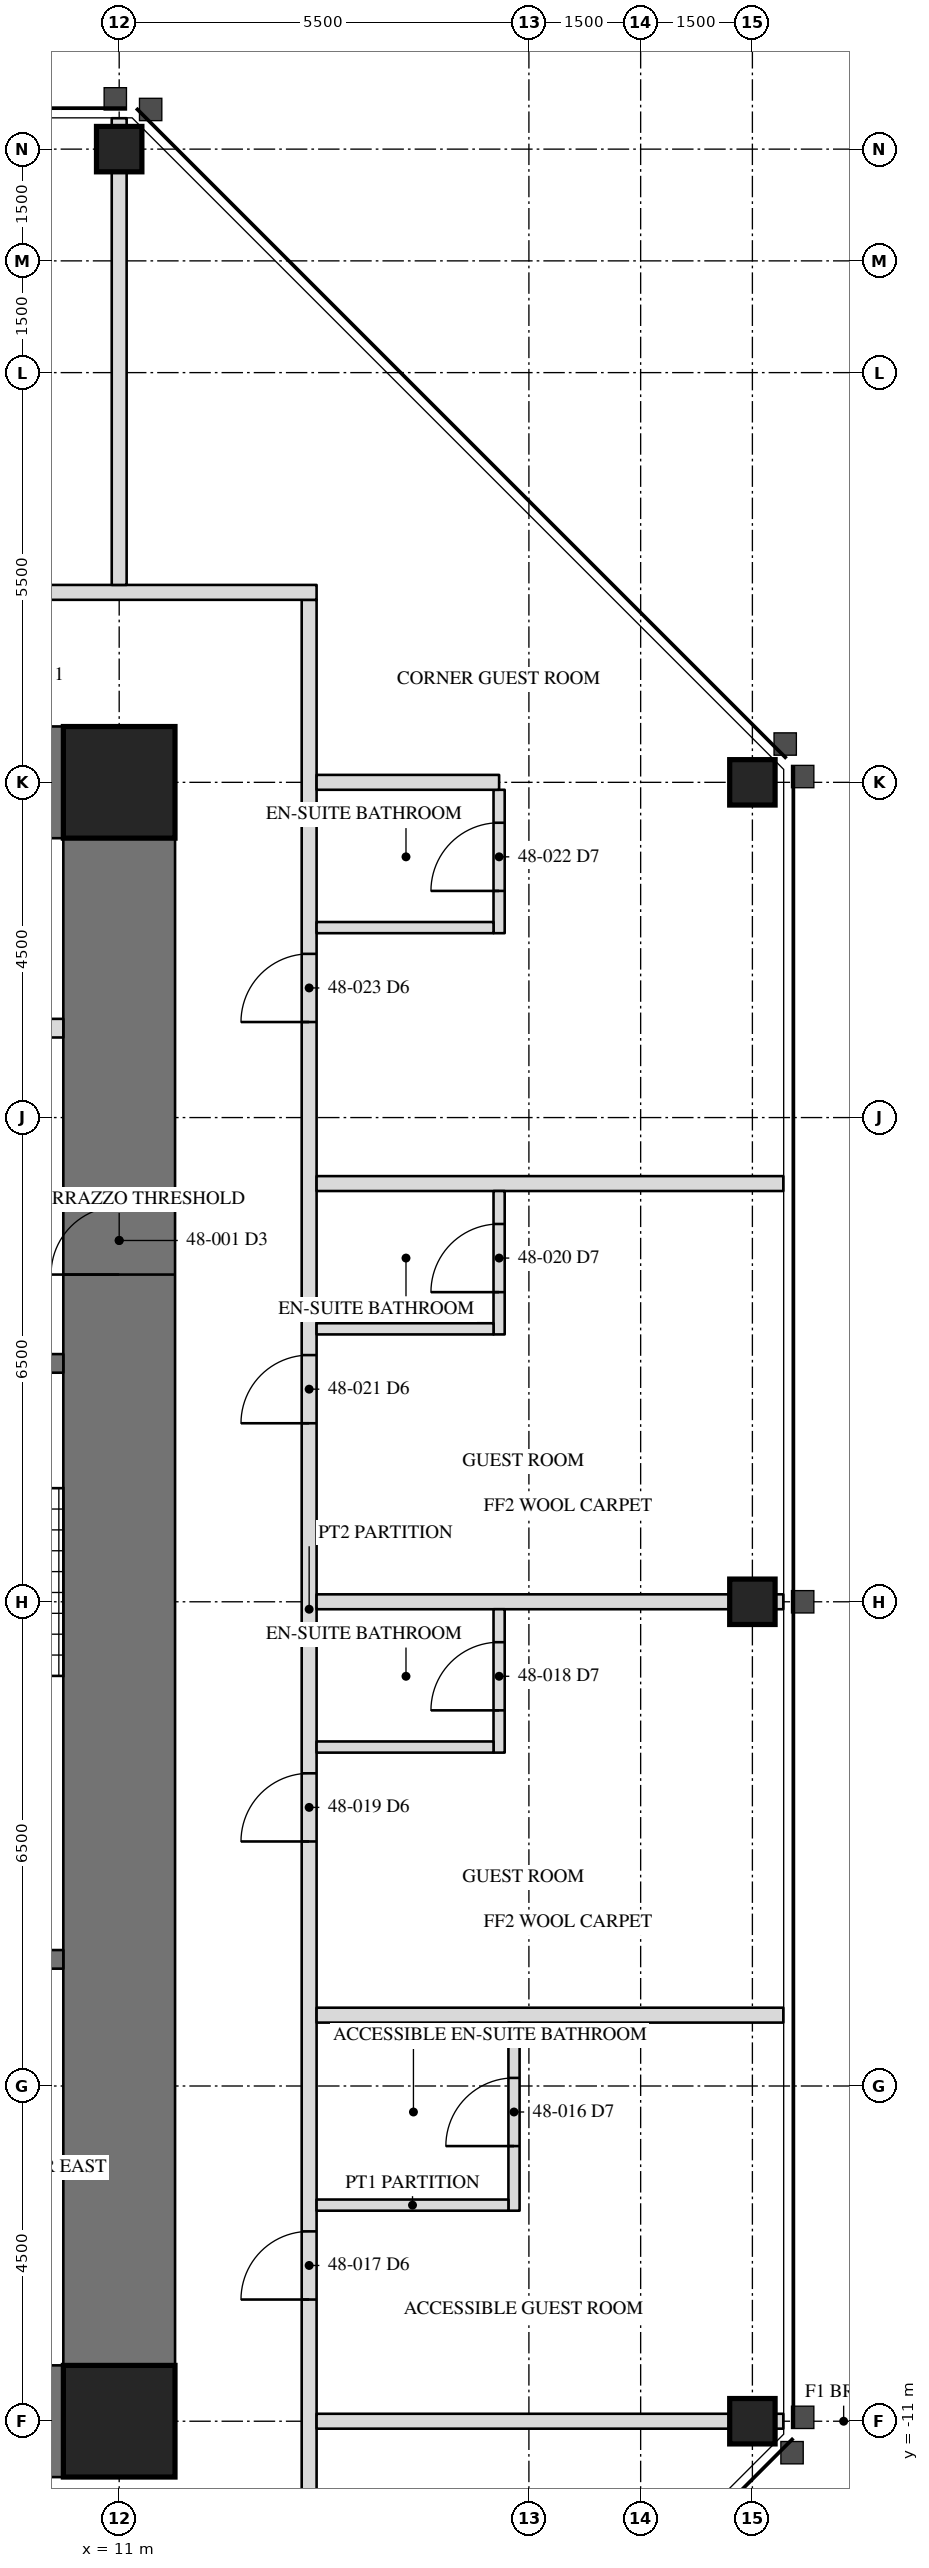
"""IFC4 building model, lengths in metres.
Left out: names, types, materials, properties, quantities, classifications, styles, units other than length and angle.
Written with IfcOpenShell. Run it as: python <this file> out.ifc"""

import sys

from ifc_helpers import new_model, si_unit, direction, frame, frame_2d, origin, origin_2d, place, context, subcontext, project, spatial, rectangle, hollow_rectangle, extrude, element, fill, save


model = new_model("IFC4")
c1 = context("Model", 3, precision=1e-05, world=origin(), true_north=direction((0.0, 1.0)))
c2 = subcontext(c1, "Body", "Model", "MODEL_VIEW")
j1 = project(units=[si_unit("LENGTHUNIT", "METRE"), si_unit("PLANEANGLEUNIT", "RADIAN")], contexts=[c1])
p1 = place(None, origin())
s1 = spatial("IfcSite", under=j1, at=p1, CompositionType="ELEMENT")
p2 = place(p1, origin())
s2 = spatial("IfcBuilding", under=s1, at=p2, CompositionType="ELEMENT")
p3 = place(p2, frame((0.0, 0.0, 204.7)))
s3 = spatial("IfcBuildingStorey", under=s2, at=p3, CompositionType="ELEMENT", Elevation=204.7)
for number, where, z_axis, x_axis in (
    (1, (19.5, -11.0, 0.0), (0.0, 0.0, 1.0), (0.0, 1.0, 0.0)),
    (2, (19.5, 0.0, 0.0), (0.0, 0.0, 1.0), (0.0, 1.0, 0.0)),
    (3, (19.5, 11.0, 0.0), (0.0, 0.0, 1.0), (0.0, 1.0, 0.0)),
    (4, (11.0, 19.5, 0.0), (0.0, 0.0, 1.0), (1.0, 0.0, 0.0)),
):
    element("IfcColumn", number, at=place(p3, frame(where, z_axis=z_axis, x_axis=x_axis)), inside=s3, PredefinedType="COLUMN", context=c2, shape_type="SweptSolid", body=[
        extrude(hollow_rectangle(XDim=0.61, YDim=0.61, WallThickness=0.076, at=origin_2d()), origin(), (0.0, 0.0, 1.0), 3.5),
    ])
p4 = place(p3, frame((11.0, -11.0, 0.0), z_axis=(0.0, 0.0, 1.0), x_axis=(0.0, 1.0, 0.0)))
e5 = element("IfcWall", 5, at=p4, inside=s3, PredefinedType="SHEAR", context=c2, shape_type="SweptSolid", body=[
    extrude(rectangle(XDim=22.0, YDim=1.5, at=frame_2d((11.0, 0.0))), origin(), (0.0, 0.0, 1.0), 3.5),
])
p5 = place(p4, frame((15.393, 0.0, 0.0)))
e6 = element("IfcOpeningElement", 6, at=p5, cuts=e5, PredefinedType="OPENING", context=c2, shape_type="SweptSolid", body=[
    extrude(rectangle(XDim=0.915, YDim=2.134, at=frame_2d((0.458, 1.067))), frame((0.0, 0.76, 0.0), z_axis=(0.0, -1.0, 0.0), x_axis=(1.0, 0.0, 0.0)), (0.0, 0.0, 1.0), 1.52),
])
for number, where, z_axis, x_axis in (
    (7, (11.0, 11.0, 0.0), (0.0, 0.0, 1.0), (-1.0, 0.0, 0.0)),
    (8, (6.5, -11.0, 0.0), (0.0, 0.0, 1.0), (1.0, 0.0, 0.0)),
):
    element("IfcWall", number, at=place(p3, frame(where, z_axis=z_axis, x_axis=x_axis)), inside=s3, PredefinedType="SHEAR", context=c2, shape_type="SweptSolid", body=[
        extrude(rectangle(XDim=4.5, YDim=1.5, at=frame_2d((2.25, 0.0))), origin(), (0.0, 0.0, 1.0), 3.5),
    ])
for number, where, z_axis, x_axis in (
    (9, (11.0, 11.0, 0.0), (0.0, 0.0, 1.0), (1.0, 0.0, 0.0)),
    (10, (11.0, -11.0, 0.0), (0.0, 0.0, 1.0), (1.0, 0.0, 0.0)),
):
    element("IfcColumn", number, at=place(p3, frame(where, z_axis=z_axis, x_axis=x_axis)), inside=s3, PredefinedType="COLUMN", context=c2, shape_type="SweptSolid", body=[
        extrude(hollow_rectangle(XDim=1.499, YDim=1.499, WallThickness=0.102, at=origin_2d()), origin(), (0.0, 0.0, 1.0), 3.5),
    ])
p6 = place(p3, frame((6.95, -4.8, 0.0), z_axis=(0.0, 0.0, 1.0), x_axis=(1.0, 0.0, 0.0)))
e11 = element("IfcWall", 11, at=p6, inside=s3, PredefinedType="SOLIDWALL", context=c2, shape_type="SweptSolid", body=[
    extrude(rectangle(XDim=3.3, YDim=0.25, at=frame_2d((1.65, 0.0))), origin(), (0.0, 0.0, 1.0), 3.31),
])
p7 = place(p3, frame((6.95, 3.2, 0.0), z_axis=(0.0, 0.0, 1.0), x_axis=(1.0, 0.0, 0.0)))
e12 = element("IfcWall", 12, at=p7, inside=s3, PredefinedType="SOLIDWALL", context=c2, shape_type="SweptSolid", body=[
    extrude(rectangle(XDim=3.3, YDim=0.25, at=frame_2d((1.65, 0.0))), origin(), (0.0, 0.0, 1.0), 3.31),
])
p8 = place(p7, frame((1.116, 0.0, 0.0)))
e13 = element("IfcOpeningElement", 13, at=p8, cuts=e12, PredefinedType="OPENING", context=c2, shape_type="SweptSolid", body=[
    extrude(rectangle(XDim=1.067, YDim=2.134, at=frame_2d((0.533, 1.067))), frame((0.0, 0.135, 0.0), z_axis=(0.0, -1.0, 0.0), x_axis=(1.0, 0.0, 0.0)), (0.0, 0.0, 1.0), 0.27),
])
p9 = place(p3, frame((6.95, 7.7, 0.0), z_axis=(0.0, 0.0, 1.0), x_axis=(1.0, 0.0, 0.0)))
e14 = element("IfcWall", 14, at=p9, inside=s3, PredefinedType="PARTITIONING", context=c2, shape_type="SweptSolid", body=[
    extrude(rectangle(XDim=3.3, YDim=0.25, at=frame_2d((1.65, 0.0))), origin(), (0.0, 0.0, 1.0), 3.31),
])
p10 = place(p9, frame((0.45, 0.0, 0.0)))
e15 = element("IfcOpeningElement", 15, at=p10, cuts=e14, PredefinedType="OPENING", context=c2, shape_type="SweptSolid", body=[
    extrude(rectangle(XDim=1.219, YDim=2.134, at=frame_2d((0.609, 1.067))), frame((0.0, 0.135, 0.0), z_axis=(0.0, -1.0, 0.0), x_axis=(1.0, 0.0, 0.0)), (0.0, 0.0, 1.0), 0.27),
])
p11 = place(p3, frame((13.55, -13.65, 0.0), z_axis=(0.0, 0.0, 1.0), x_axis=(0.0, 1.0, 0.0)))
e16 = element("IfcWall", 16, at=p11, inside=s3, PredefinedType="PARTITIONING", context=c2, shape_type="SweptSolid", body=[
    extrude(rectangle(XDim=27.1, YDim=0.2, at=frame_2d((13.55, 0.0))), origin(), (0.0, 0.0, 1.0), 3.31),
])
p12 = place(p11, frame((4.283, 0.0, 0.0)))
e17 = element("IfcOpeningElement", 17, at=p12, cuts=e16, PredefinedType="OPENING", context=c2, shape_type="SweptSolid", body=[
    extrude(rectangle(XDim=0.915, YDim=2.134, at=frame_2d((0.458, 1.067))), frame((0.0, 0.11, 0.0), z_axis=(0.0, -1.0, 0.0), x_axis=(1.0, 0.0, 0.0)), (0.0, 0.0, 1.0), 0.22),
])
p13 = place(p11, frame((10.433, 0.0, 0.0)))
e18 = element("IfcOpeningElement", 18, at=p13, cuts=e16, PredefinedType="OPENING", context=c2, shape_type="SweptSolid", body=[
    extrude(rectangle(XDim=0.915, YDim=2.134, at=frame_2d((0.458, 1.067))), frame((0.0, 0.11, 0.0), z_axis=(0.0, -1.0, 0.0), x_axis=(1.0, 0.0, 0.0)), (0.0, 0.0, 1.0), 0.22),
])
p14 = place(p11, frame((16.046, 0.0, 0.0)))
e19 = element("IfcOpeningElement", 19, at=p14, cuts=e16, PredefinedType="OPENING", context=c2, shape_type="SweptSolid", body=[
    extrude(rectangle(XDim=0.915, YDim=2.134, at=frame_2d((0.458, 1.067))), frame((0.0, 0.11, 0.0), z_axis=(0.0, -1.0, 0.0), x_axis=(1.0, 0.0, 0.0)), (0.0, 0.0, 1.0), 0.22),
])
p15 = place(p11, frame((21.433, 0.0, 0.0)))
e20 = element("IfcOpeningElement", 20, at=p15, cuts=e16, PredefinedType="OPENING", context=c2, shape_type="SweptSolid", body=[
    extrude(rectangle(XDim=0.915, YDim=2.134, at=frame_2d((0.458, 1.067))), frame((0.0, 0.11, 0.0), z_axis=(0.0, -1.0, 0.0), x_axis=(1.0, 0.0, 0.0)), (0.0, 0.0, 1.0), 0.22),
])
p16 = place(p3, frame((13.65, 13.55, 0.0), z_axis=(0.0, 0.0, 1.0), x_axis=(-1.0, 0.0, 0.0)))
e21 = element("IfcWall", 21, at=p16, inside=s3, PredefinedType="PARTITIONING", context=c2, shape_type="SweptSolid", body=[
    extrude(rectangle(XDim=27.1, YDim=0.2, at=frame_2d((13.55, 0.0))), origin(), (0.0, 0.0, 1.0), 3.31),
])
p17 = place(p16, frame((7.058, 0.0, 0.0)))
e22 = element("IfcOpeningElement", 22, at=p17, cuts=e21, PredefinedType="OPENING", context=c2, shape_type="SweptSolid", body=[
    extrude(rectangle(XDim=0.915, YDim=2.134, at=frame_2d((0.458, 1.067))), frame((0.0, 0.11, 0.0), z_axis=(0.0, -1.0, 0.0), x_axis=(1.0, 0.0, 0.0)), (0.0, 0.0, 1.0), 0.22),
])
p18 = place(p16, frame((13.24, 0.0, 0.0)))
e23 = element("IfcOpeningElement", 23, at=p18, cuts=e21, PredefinedType="OPENING", context=c2, shape_type="SweptSolid", body=[
    extrude(rectangle(XDim=0.915, YDim=2.134, at=frame_2d((0.458, 1.067))), frame((0.0, 0.11, 0.0), z_axis=(0.0, -1.0, 0.0), x_axis=(1.0, 0.0, 0.0)), (0.0, 0.0, 1.0), 0.22),
])
p19 = place(p16, frame((20.833, 0.0, 0.0)))
e24 = element("IfcOpeningElement", 24, at=p19, cuts=e21, PredefinedType="OPENING", context=c2, shape_type="SweptSolid", body=[
    extrude(rectangle(XDim=0.915, YDim=2.134, at=frame_2d((0.458, 1.067))), frame((0.0, 0.11, 0.0), z_axis=(0.0, -1.0, 0.0), x_axis=(1.0, 0.0, 0.0)), (0.0, 0.0, 1.0), 0.22),
])
p20 = place(p3, frame((13.65, -11.0, 0.0), z_axis=(0.0, 0.0, 1.0), x_axis=(1.0, 0.0, 0.0)))
e25 = element("IfcWall", 25, at=p20, inside=s3, PredefinedType="PARTITIONING", context=c2, shape_type="SweptSolid", body=[
    extrude(rectangle(XDim=6.265, YDim=0.2, at=frame_2d((3.133, 0.0))), origin(), (0.0, 0.0, 1.0), 2.802),
])
p21 = place(p3, frame((13.65, -5.549, 0.0), z_axis=(0.0, 0.0, 1.0), x_axis=(1.0, 0.0, 0.0)))
e26 = element("IfcWall", 26, at=p21, inside=s3, PredefinedType="PARTITIONING", context=c2, shape_type="SweptSolid", body=[
    extrude(rectangle(XDim=6.265, YDim=0.2, at=frame_2d((3.133, 0.0))), origin(), (0.0, 0.0, 1.0), 3.31),
])
p22 = place(p3, frame((13.65, 0.0, 0.0), z_axis=(0.0, 0.0, 1.0), x_axis=(1.0, 0.0, 0.0)))
e27 = element("IfcWall", 27, at=p22, inside=s3, PredefinedType="PARTITIONING", context=c2, shape_type="SweptSolid", body=[
    extrude(rectangle(XDim=6.265, YDim=0.2, at=frame_2d((3.133, 0.0))), origin(), (0.0, 0.0, 1.0), 2.802),
])
p23 = place(p3, frame((13.65, 5.614, 0.0), z_axis=(0.0, 0.0, 1.0), x_axis=(1.0, 0.0, 0.0)))
e28 = element("IfcWall", 28, at=p23, inside=s3, PredefinedType="PARTITIONING", context=c2, shape_type="SweptSolid", body=[
    extrude(rectangle(XDim=6.265, YDim=0.2, at=frame_2d((3.133, 0.0))), origin(), (0.0, 0.0, 1.0), 3.31),
])
p24 = place(p3, frame((16.3, -8.174, 0.0), z_axis=(0.0, 0.0, 1.0), x_axis=(0.0, 1.0, 0.0)))
e29 = element("IfcWall", 29, at=p24, inside=s3, PredefinedType="PARTITIONING", context=c2, shape_type="SweptSolid", body=[
    extrude(rectangle(XDim=2.525, YDim=0.15, at=frame_2d((1.263, 0.0))), origin(), (0.0, 0.0, 1.0), 3.31),
])
p25 = place(p24, frame((0.867, 0.0, 0.0)))
e30 = element("IfcOpeningElement", 30, at=p25, cuts=e29, PredefinedType="OPENING", context=c2, shape_type="SweptSolid", body=[
    extrude(rectangle(XDim=0.915, YDim=2.032, at=frame_2d((0.458, 1.016))), frame((0.0, 0.085, 0.0), z_axis=(0.0, -1.0, 0.0), x_axis=(1.0, 0.0, 0.0)), (0.0, 0.0, 1.0), 0.17),
])
p26 = place(p3, frame((13.65, -8.099, 0.0), z_axis=(0.0, 0.0, 1.0), x_axis=(1.0, 0.0, 0.0)))
e31 = element("IfcWall", 31, at=p26, inside=s3, PredefinedType="PARTITIONING", context=c2, shape_type="SweptSolid", body=[
    extrude(rectangle(XDim=2.575, YDim=0.15, at=frame_2d((1.288, 0.0))), origin(), (0.0, 0.0, 1.0), 3.31),
])
p27 = place(p3, frame((16.1, -2.025, 0.0), z_axis=(0.0, 0.0, 1.0), x_axis=(0.0, 1.0, 0.0)))
e32 = element("IfcWall", 32, at=p27, inside=s3, PredefinedType="PARTITIONING", context=c2, shape_type="SweptSolid", body=[
    extrude(rectangle(XDim=1.925, YDim=0.15, at=frame_2d((0.962, 0.0))), origin(), (0.0, 0.0, 1.0), 3.31),
])
p28 = place(p27, frame((0.567, 0.0, 0.0)))
e33 = element("IfcOpeningElement", 33, at=p28, cuts=e32, PredefinedType="OPENING", context=c2, shape_type="SweptSolid", body=[
    extrude(rectangle(XDim=0.915, YDim=2.032, at=frame_2d((0.458, 1.016))), frame((0.0, 0.085, 0.0), z_axis=(0.0, -1.0, 0.0), x_axis=(1.0, 0.0, 0.0)), (0.0, 0.0, 1.0), 0.17),
])
p29 = place(p3, frame((13.65, -1.95, 0.0), z_axis=(0.0, 0.0, 1.0), x_axis=(1.0, 0.0, 0.0)))
e34 = element("IfcWall", 34, at=p29, inside=s3, PredefinedType="PARTITIONING", context=c2, shape_type="SweptSolid", body=[
    extrude(rectangle(XDim=2.375, YDim=0.15, at=frame_2d((1.188, 0.0))), origin(), (0.0, 0.0, 1.0), 3.31),
])
p30 = place(p3, frame((16.1, 3.589, 0.0), z_axis=(0.0, 0.0, 1.0), x_axis=(0.0, 1.0, 0.0)))
e35 = element("IfcWall", 35, at=p30, inside=s3, PredefinedType="PARTITIONING", context=c2, shape_type="SweptSolid", body=[
    extrude(rectangle(XDim=1.925, YDim=0.15, at=frame_2d((0.962, 0.0))), origin(), (0.0, 0.0, 1.0), 3.31),
])
p31 = place(p30, frame((0.567, 0.0, 0.0)))
e36 = element("IfcOpeningElement", 36, at=p31, cuts=e35, PredefinedType="OPENING", context=c2, shape_type="SweptSolid", body=[
    extrude(rectangle(XDim=0.915, YDim=2.032, at=frame_2d((0.458, 1.016))), frame((0.0, 0.085, 0.0), z_axis=(0.0, -1.0, 0.0), x_axis=(1.0, 0.0, 0.0)), (0.0, 0.0, 1.0), 0.17),
])
p32 = place(p3, frame((13.65, 3.664, 0.0), z_axis=(0.0, 0.0, 1.0), x_axis=(1.0, 0.0, 0.0)))
e37 = element("IfcWall", 37, at=p32, inside=s3, PredefinedType="PARTITIONING", context=c2, shape_type="SweptSolid", body=[
    extrude(rectangle(XDim=2.375, YDim=0.15, at=frame_2d((1.188, 0.0))), origin(), (0.0, 0.0, 1.0), 2.703),
])
p33 = place(p3, frame((16.1, 8.975, 0.0), z_axis=(0.0, 0.0, 1.0), x_axis=(0.0, 1.0, 0.0)))
e38 = element("IfcWall", 38, at=p33, inside=s3, PredefinedType="PARTITIONING", context=c2, shape_type="SweptSolid", body=[
    extrude(rectangle(XDim=1.925, YDim=0.15, at=frame_2d((0.962, 0.0))), origin(), (0.0, 0.0, 1.0), 3.31),
])
p34 = place(p33, frame((0.567, 0.0, 0.0)))
e39 = element("IfcOpeningElement", 39, at=p34, cuts=e38, PredefinedType="OPENING", context=c2, shape_type="SweptSolid", body=[
    extrude(rectangle(XDim=0.915, YDim=2.032, at=frame_2d((0.458, 1.016))), frame((0.0, 0.085, 0.0), z_axis=(0.0, -1.0, 0.0), x_axis=(1.0, 0.0, 0.0)), (0.0, 0.0, 1.0), 0.17),
])
p35 = place(p3, frame((13.65, 9.05, 0.0), z_axis=(0.0, 0.0, 1.0), x_axis=(1.0, 0.0, 0.0)))
e40 = element("IfcWall", 40, at=p35, inside=s3, PredefinedType="PARTITIONING", context=c2, shape_type="SweptSolid", body=[
    extrude(rectangle(XDim=2.375, YDim=0.15, at=frame_2d((1.188, 0.0))), origin(), (0.0, 0.0, 1.0), 3.31),
])
p36 = place(p3, frame((13.65, 11.0, 0.0), z_axis=(0.0, 0.0, 1.0), x_axis=(1.0, 0.0, 0.0)))
e41 = element("IfcWall", 41, at=p36, inside=s3, PredefinedType="PARTITIONING", context=c2, shape_type="SweptSolid", body=[
    extrude(rectangle(XDim=2.45, YDim=0.2, at=frame_2d((1.225, 0.0))), origin(), (0.0, 0.0, 1.0), 2.802),
])
p37 = place(p3, frame((11.0, 13.65, 0.0), z_axis=(0.0, 0.0, 1.0), x_axis=(0.0, 1.0, 0.0)))
e42 = element("IfcWall", 42, at=p37, inside=s3, PredefinedType="PARTITIONING", context=c2, shape_type="SweptSolid", body=[
    extrude(rectangle(XDim=6.265, YDim=0.2, at=frame_2d((3.133, 0.0))), origin(), (0.0, 0.0, 1.0), 2.802),
])
p38 = place(p5, origin())
e43 = element("IfcDoor", 43, at=p38, inside=s3, OperationType="SINGLE_SWING_RIGHT", PredefinedType="DOOR", context=c2, shape_type="SweptSolid", body=[
    extrude(rectangle(XDim=0.915, YDim=2.134, at=frame_2d((0.458, 1.067))), frame((0.0, -0.675, 0.0), z_axis=(0.0, -1.0, 0.0), x_axis=(1.0, 0.0, 0.0)), (0.0, 0.0, 1.0), 0.05),
])
fill(e6, e43)
p39 = place(p25, origin())
e44 = element("IfcDoor", 44, at=p39, inside=s3, OperationType="SINGLE_SWING_LEFT", PredefinedType="DOOR", context=c2, shape_type="SweptSolid", body=[
    extrude(rectangle(XDim=0.915, YDim=2.032, at=frame_2d((0.458, 1.016))), frame((0.0, 0.025, 0.0), z_axis=(0.0, -1.0, 0.0), x_axis=(1.0, 0.0, 0.0)), (0.0, 0.0, 1.0), 0.05),
])
fill(e30, e44)
p40 = place(p12, origin())
e45 = element("IfcDoor", 45, at=p40, inside=s3, OperationType="SINGLE_SWING_LEFT", PredefinedType="DOOR", context=c2, shape_type="SweptSolid", body=[
    extrude(rectangle(XDim=0.915, YDim=2.134, at=frame_2d((0.458, 1.067))), frame((0.0, 0.025, 0.0), z_axis=(0.0, -1.0, 0.0), x_axis=(1.0, 0.0, 0.0)), (0.0, 0.0, 1.0), 0.05),
])
fill(e17, e45)
p41 = place(p28, origin())
e46 = element("IfcDoor", 46, at=p41, inside=s3, OperationType="SINGLE_SWING_LEFT", PredefinedType="DOOR", context=c2, shape_type="SweptSolid", body=[
    extrude(rectangle(XDim=0.915, YDim=2.032, at=frame_2d((0.458, 1.016))), frame((0.0, 0.025, 0.0), z_axis=(0.0, -1.0, 0.0), x_axis=(1.0, 0.0, 0.0)), (0.0, 0.0, 1.0), 0.05),
])
fill(e33, e46)
p42 = place(p13, origin())
e47 = element("IfcDoor", 47, at=p42, inside=s3, OperationType="SINGLE_SWING_LEFT", PredefinedType="DOOR", context=c2, shape_type="SweptSolid", body=[
    extrude(rectangle(XDim=0.915, YDim=2.134, at=frame_2d((0.458, 1.067))), frame((0.0, 0.025, 0.0), z_axis=(0.0, -1.0, 0.0), x_axis=(1.0, 0.0, 0.0)), (0.0, 0.0, 1.0), 0.05),
])
fill(e18, e47)
p43 = place(p31, origin())
e48 = element("IfcDoor", 48, at=p43, inside=s3, OperationType="SINGLE_SWING_LEFT", PredefinedType="DOOR", context=c2, shape_type="SweptSolid", body=[
    extrude(rectangle(XDim=0.915, YDim=2.032, at=frame_2d((0.458, 1.016))), frame((0.0, 0.025, 0.0), z_axis=(0.0, -1.0, 0.0), x_axis=(1.0, 0.0, 0.0)), (0.0, 0.0, 1.0), 0.05),
])
fill(e36, e48)
p44 = place(p14, origin())
e49 = element("IfcDoor", 49, at=p44, inside=s3, OperationType="SINGLE_SWING_LEFT", PredefinedType="DOOR", context=c2, shape_type="SweptSolid", body=[
    extrude(rectangle(XDim=0.915, YDim=2.134, at=frame_2d((0.458, 1.067))), frame((0.0, 0.025, 0.0), z_axis=(0.0, -1.0, 0.0), x_axis=(1.0, 0.0, 0.0)), (0.0, 0.0, 1.0), 0.05),
])
fill(e19, e49)
p45 = place(p34, origin())
e50 = element("IfcDoor", 50, at=p45, inside=s3, OperationType="SINGLE_SWING_LEFT", PredefinedType="DOOR", context=c2, shape_type="SweptSolid", body=[
    extrude(rectangle(XDim=0.915, YDim=2.032, at=frame_2d((0.458, 1.016))), frame((0.0, 0.025, 0.0), z_axis=(0.0, -1.0, 0.0), x_axis=(1.0, 0.0, 0.0)), (0.0, 0.0, 1.0), 0.05),
])
fill(e39, e50)
p46 = place(p15, origin())
e51 = element("IfcDoor", 51, at=p46, inside=s3, OperationType="SINGLE_SWING_LEFT", PredefinedType="DOOR", context=c2, shape_type="SweptSolid", body=[
    extrude(rectangle(XDim=0.915, YDim=2.134, at=frame_2d((0.458, 1.067))), frame((0.0, 0.025, 0.0), z_axis=(0.0, -1.0, 0.0), x_axis=(1.0, 0.0, 0.0)), (0.0, 0.0, 1.0), 0.05),
])
fill(e20, e51)
save(model, sys.argv[1])
